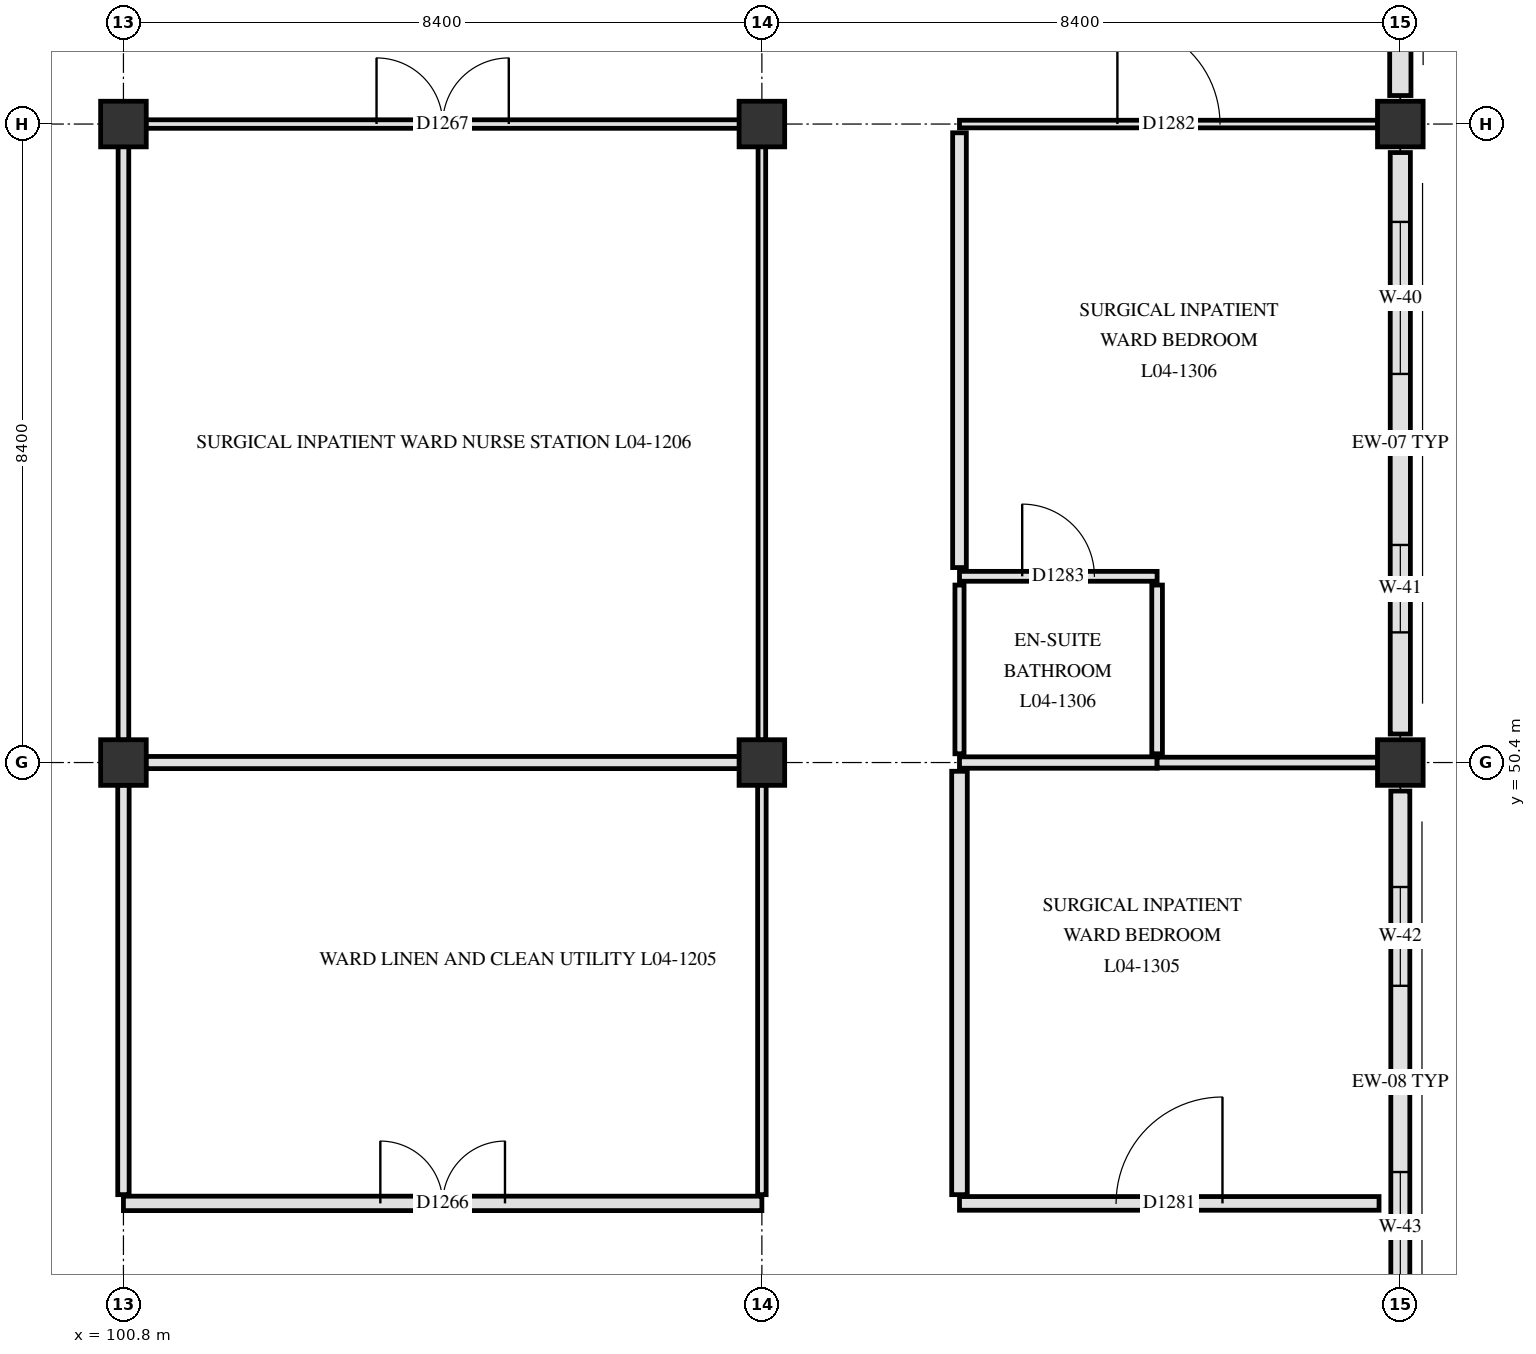
"""IFC4 building model, lengths in metres.
Left out: names, types, materials, properties, quantities, classifications, styles, units other than length and angle.
Written with IfcOpenShell. Run it as: python <this file> out.ifc"""

import sys

from ifc_helpers import new_model, si_unit, direction, frame, frame_2d, origin, origin_2d, place, context, subcontext, project, spatial, rectangle, extrude, element, fill, save


model = new_model("IFC4")
c1 = context("Model", 3, precision=1e-05, world=origin(), true_north=direction((0.0, 1.0)))
c2 = subcontext(c1, "Body", "Model", "MODEL_VIEW")
j1 = project(units=[si_unit("LENGTHUNIT", "METRE"), si_unit("PLANEANGLEUNIT", "RADIAN")], contexts=[c1])
p1 = place(None, origin())
s1 = spatial("IfcSite", under=j1, at=p1, CompositionType="ELEMENT")
p2 = place(p1, origin())
s2 = spatial("IfcBuilding", under=s1, at=p2, CompositionType="ELEMENT")
p3 = place(p2, frame((0.0, 0.0, 18.6)))
s3 = spatial("IfcBuildingStorey", under=s2, at=p3, CompositionType="ELEMENT", Elevation=18.6)
for number, where, z_axis, x_axis in (
    (1, (100.8, 50.4, 0.0), (0.0, 0.0, 1.0), (1.0, 0.0, 0.0)),
    (2, (100.8, 58.8, 0.0), (0.0, 0.0, 1.0), (1.0, 0.0, 0.0)),
    (3, (109.2, 50.4, 0.0), (0.0, 0.0, 1.0), (1.0, 0.0, 0.0)),
    (4, (109.2, 58.8, 0.0), (0.0, 0.0, 1.0), (1.0, 0.0, 0.0)),
    (5, (117.6, 50.4, 0.0), (0.0, 0.0, 1.0), (1.0, 0.0, 0.0)),
    (6, (117.6, 58.8, 0.0), (0.0, 0.0, 1.0), (1.0, 0.0, 0.0)),
):
    element("IfcColumn", number, at=place(p3, frame(where, z_axis=z_axis, x_axis=x_axis)), inside=s3, PredefinedType="COLUMN", context=c2, shape_type="SweptSolid", body=[
        extrude(rectangle(XDim=0.6, YDim=0.6, at=origin_2d()), origin(), (0.0, 0.0, 1.0), 3.9),
    ])
p4 = place(p3, frame((117.6, 67.2, 0.0), z_axis=(0.0, 0.0, 1.0), x_axis=(0.0, -1.0, 0.0)))
e7 = element("IfcWall", 7, at=p4, inside=s3, PredefinedType="SOLIDWALL", context=c2, shape_type="SweptSolid", body=[
    extrude(rectangle(XDim=8.025, YDim=0.28, at=frame_2d((4.012, 0.0))), origin(), (0.0, 0.0, 1.0), 3.11),
])
p5 = place(p4, frame((1.106, 0.0, 0.85)))
e8 = element("IfcOpeningElement", 8, at=p5, cuts=e7, PredefinedType="OPENING", context=c2, shape_type="SweptSolid", body=[
    extrude(rectangle(XDim=1.8, YDim=1.66, at=frame_2d((0.9, 0.83))), frame((0.0, 0.15, 0.0), z_axis=(0.0, -1.0, 0.0), x_axis=(1.0, 0.0, 0.0)), (0.0, 0.0, 1.0), 0.3),
])
p6 = place(p4, frame((5.069, 0.0, 0.85)))
e9 = element("IfcOpeningElement", 9, at=p6, cuts=e7, PredefinedType="OPENING", context=c2, shape_type="SweptSolid", body=[
    extrude(rectangle(XDim=1.9, YDim=1.66, at=frame_2d((0.95, 0.83))), frame((0.0, 0.15, 0.0), z_axis=(0.0, -1.0, 0.0), x_axis=(1.0, 0.0, 0.0)), (0.0, 0.0, 1.0), 0.3),
])
p7 = place(p3, frame((117.6, 58.425, 0.0), z_axis=(0.0, 0.0, 1.0), x_axis=(0.0, -1.0, 0.0)))
e10 = element("IfcWall", 10, at=p7, inside=s3, PredefinedType="SOLIDWALL", context=c2, shape_type="SweptSolid", body=[
    extrude(rectangle(XDim=7.65, YDim=0.265, at=frame_2d((3.825, 0.0))), origin(), (0.0, 0.0, 1.0), 3.38),
])
p8 = place(p7, frame((0.913, 0.0, 0.85)))
e11 = element("IfcOpeningElement", 11, at=p8, cuts=e10, PredefinedType="OPENING", context=c2, shape_type="SweptSolid", body=[
    extrude(rectangle(XDim=2.0, YDim=1.66, at=frame_2d((1.0, 0.83))), frame((0.0, 0.142, 0.0), z_axis=(0.0, -1.0, 0.0), x_axis=(1.0, 0.0, 0.0)), (0.0, 0.0, 1.0), 0.285),
])
p9 = place(p7, frame((5.163, 0.0, 0.85)))
e12 = element("IfcOpeningElement", 12, at=p9, cuts=e10, PredefinedType="OPENING", context=c2, shape_type="SweptSolid", body=[
    extrude(rectangle(XDim=1.15, YDim=1.78, at=frame_2d((0.575, 0.89))), frame((0.0, 0.142, 0.0), z_axis=(0.0, -1.0, 0.0), x_axis=(1.0, 0.0, 0.0)), (0.0, 0.0, 1.0), 0.285),
])
p10 = place(p3, frame((117.6, 50.025, 0.0), z_axis=(0.0, 0.0, 1.0), x_axis=(0.0, -1.0, 0.0)))
e13 = element("IfcWall", 13, at=p10, inside=s3, PredefinedType="SOLIDWALL", context=c2, shape_type="SweptSolid", body=[
    extrude(rectangle(XDim=7.65, YDim=0.25, at=frame_2d((3.825, 0.0))), origin(), (0.0, 0.0, 1.0), 3.38),
])
p11 = place(p10, frame((1.262, 0.0, 0.85)))
e14 = element("IfcOpeningElement", 14, at=p11, cuts=e13, PredefinedType="OPENING", context=c2, shape_type="SweptSolid", body=[
    extrude(rectangle(XDim=1.3, YDim=1.78, at=frame_2d((0.65, 0.89))), frame((0.0, 0.135, 0.0), z_axis=(0.0, -1.0, 0.0), x_axis=(1.0, 0.0, 0.0)), (0.0, 0.0, 1.0), 0.27),
])
p12 = place(p10, frame((5.012, 0.0, 0.85)))
e15 = element("IfcOpeningElement", 15, at=p12, cuts=e13, PredefinedType="OPENING", context=c2, shape_type="SweptSolid", body=[
    extrude(rectangle(XDim=1.45, YDim=1.78, at=frame_2d((0.725, 0.89))), frame((0.0, 0.135, 0.0), z_axis=(0.0, -1.0, 0.0), x_axis=(1.0, 0.0, 0.0)), (0.0, 0.0, 1.0), 0.27),
])
p13 = place(p3, frame((100.8, 44.6, 0.0), z_axis=(0.0, 0.0, 1.0), x_axis=(1.0, 0.0, 0.0)))
e16 = element("IfcWall", 16, at=p13, inside=s3, PredefinedType="PARTITIONING", context=c2, shape_type="SweptSolid", body=[
    extrude(rectangle(XDim=8.4, YDim=0.19, at=frame_2d((4.2, 0.0))), origin(), (0.0, 0.0, 1.0), 3.26),
])
p14 = place(p13, frame((3.38, 0.0, 0.0)))
e17 = element("IfcOpeningElement", 17, at=p14, cuts=e16, PredefinedType="OPENING", context=c2, shape_type="SweptSolid", body=[
    extrude(rectangle(XDim=1.64, YDim=2.28, at=frame_2d((0.82, 1.14))), frame((0.0, 0.105, 0.0), z_axis=(0.0, -1.0, 0.0), x_axis=(1.0, 0.0, 0.0)), (0.0, 0.0, 1.0), 0.21),
])
p15 = place(p3, frame((111.8, 44.6, 0.0), z_axis=(0.0, 0.0, 1.0), x_axis=(1.0, 0.0, 0.0)))
e18 = element("IfcWall", 18, at=p15, inside=s3, PredefinedType="PARTITIONING", context=c2, shape_type="SweptSolid", body=[
    extrude(rectangle(XDim=5.52, YDim=0.18, at=frame_2d((2.76, 0.0))), origin(), (0.0, 0.0, 1.0), 3.61),
])
p16 = place(p15, frame((2.06, 0.0, 0.0)))
e19 = element("IfcOpeningElement", 19, at=p16, cuts=e18, PredefinedType="OPENING", context=c2, shape_type="SweptSolid", body=[
    extrude(rectangle(XDim=1.4, YDim=2.2, at=frame_2d((0.7, 1.1))), frame((0.0, 0.1, 0.0), z_axis=(0.0, -1.0, 0.0), x_axis=(1.0, 0.0, 0.0)), (0.0, 0.0, 1.0), 0.2),
])
p17 = place(p3, frame((101.095, 50.4, 0.0), z_axis=(0.0, 0.0, 1.0), x_axis=(1.0, 0.0, 0.0)))
e20 = element("IfcWall", 20, at=p17, inside=s3, PredefinedType="PARTITIONING", context=c2, shape_type="SweptSolid", body=[
    extrude(rectangle(XDim=7.81, YDim=0.16, at=frame_2d((3.905, 0.0))), origin(), (0.0, 0.0, 1.0), 3.16),
])
p18 = place(p3, frame((111.8, 50.4, 0.0), z_axis=(0.0, 0.0, 1.0), x_axis=(1.0, 0.0, 0.0)))
e21 = element("IfcWall", 21, at=p18, inside=s3, PredefinedType="PARTITIONING", context=c2, shape_type="SweptSolid", body=[
    extrude(rectangle(XDim=2.6, YDim=0.15, at=frame_2d((1.3, 0.0))), origin(), (0.0, 0.0, 1.0), 3.16),
])
p19 = place(p3, frame((114.4, 50.4, 0.0), z_axis=(0.0, 0.0, 1.0), x_axis=(1.0, 0.0, 0.0)))
e22 = element("IfcWall", 22, at=p19, inside=s3, PredefinedType="PARTITIONING", context=c2, shape_type="SweptSolid", body=[
    extrude(rectangle(XDim=2.905, YDim=0.14, at=frame_2d((1.453, 0.0))), origin(), (0.0, 0.0, 1.0), 3.16),
])
p20 = place(p3, frame((111.8, 52.85, 0.0), z_axis=(0.0, 0.0, 1.0), x_axis=(1.0, 0.0, 0.0)))
e23 = element("IfcWall", 23, at=p20, inside=s3, PredefinedType="PARTITIONING", context=c2, shape_type="SweptSolid", body=[
    extrude(rectangle(XDim=2.6, YDim=0.13, at=frame_2d((1.3, 0.0))), origin(), (0.0, 0.0, 1.0), 3.61),
])
p21 = place(p20, frame((0.825, 0.0, 0.0)))
e24 = element("IfcOpeningElement", 24, at=p21, cuts=e23, PredefinedType="OPENING", context=c2, shape_type="SweptSolid", body=[
    extrude(rectangle(XDim=0.95, YDim=2.1, at=frame_2d((0.475, 1.05))), frame((0.0, 0.075, 0.0), z_axis=(0.0, -1.0, 0.0), x_axis=(1.0, 0.0, 0.0)), (0.0, 0.0, 1.0), 0.15),
])
p22 = place(p3, frame((101.095, 58.8, 0.0), z_axis=(0.0, 0.0, 1.0), x_axis=(1.0, 0.0, 0.0)))
e25 = element("IfcWall", 25, at=p22, inside=s3, PredefinedType="PARTITIONING", context=c2, shape_type="SweptSolid", body=[
    extrude(rectangle(XDim=7.81, YDim=0.112, at=frame_2d((3.905, 0.0))), origin(), (0.0, 0.0, 1.0), 3.16),
])
p23 = place(p22, frame((3.035, 0.0, 0.0)))
e26 = element("IfcOpeningElement", 26, at=p23, cuts=e25, PredefinedType="OPENING", context=c2, shape_type="SweptSolid", body=[
    extrude(rectangle(XDim=1.74, YDim=2.24, at=frame_2d((0.87, 1.12))), frame((0.0, 0.066, 0.0), z_axis=(0.0, -1.0, 0.0), x_axis=(1.0, 0.0, 0.0)), (0.0, 0.0, 1.0), 0.132),
])
p24 = place(p3, frame((111.8, 58.8, 0.0), z_axis=(0.0, 0.0, 1.0), x_axis=(1.0, 0.0, 0.0)))
e27 = element("IfcWall", 27, at=p24, inside=s3, PredefinedType="PARTITIONING", context=c2, shape_type="SweptSolid", body=[
    extrude(rectangle(XDim=5.505, YDim=0.1, at=frame_2d((2.752, 0.0))), origin(), (0.0, 0.0, 1.0), 3.16),
])
p25 = place(p24, frame((2.077, 0.0, 0.0)))
e28 = element("IfcOpeningElement", 28, at=p25, cuts=e27, PredefinedType="OPENING", context=c2, shape_type="SweptSolid", body=[
    extrude(rectangle(XDim=1.35, YDim=2.2, at=frame_2d((0.675, 1.1))), frame((0.0, 0.06, 0.0), z_axis=(0.0, -1.0, 0.0), x_axis=(1.0, 0.0, 0.0)), (0.0, 0.0, 1.0), 0.12),
])
p26 = place(p3, frame((100.8, 44.715, 0.0), z_axis=(0.0, 0.0, 1.0), x_axis=(0.0, 1.0, 0.0)))
e29 = element("IfcWall", 29, at=p26, inside=s3, PredefinedType="PARTITIONING", context=c2, shape_type="SweptSolid", body=[
    extrude(rectangle(XDim=5.39, YDim=0.15, at=frame_2d((2.695, 0.0))), origin(), (0.0, 0.0, 1.0), 3.26),
])
p27 = place(p3, frame((100.8, 50.695, 0.0), z_axis=(0.0, 0.0, 1.0), x_axis=(0.0, 1.0, 0.0)))
e30 = element("IfcWall", 30, at=p27, inside=s3, PredefinedType="PARTITIONING", context=c2, shape_type="SweptSolid", body=[
    extrude(rectangle(XDim=7.81, YDim=0.14, at=frame_2d((3.905, 0.0))), origin(), (0.0, 0.0, 1.0), 3.26),
])
p28 = place(p3, frame((109.2, 44.715, 0.0), z_axis=(0.0, 0.0, 1.0), x_axis=(0.0, 1.0, 0.0)))
e31 = element("IfcWall", 31, at=p28, inside=s3, PredefinedType="PARTITIONING", context=c2, shape_type="SweptSolid", body=[
    extrude(rectangle(XDim=5.39, YDim=0.112, at=frame_2d((2.695, 0.0))), origin(), (0.0, 0.0, 1.0), 3.26),
])
p29 = place(p3, frame((109.2, 50.695, 0.0), z_axis=(0.0, 0.0, 1.0), x_axis=(0.0, 1.0, 0.0)))
e32 = element("IfcWall", 32, at=p29, inside=s3, PredefinedType="PARTITIONING", context=c2, shape_type="SweptSolid", body=[
    extrude(rectangle(XDim=7.81, YDim=0.1, at=frame_2d((3.905, 0.0))), origin(), (0.0, 0.0, 1.0), 3.26),
])
p30 = place(p3, frame((111.8, 44.715, 0.0), z_axis=(0.0, 0.0, 1.0), x_axis=(0.0, 1.0, 0.0)))
e33 = element("IfcWall", 33, at=p30, inside=s3, PredefinedType="PARTITIONING", context=c2, shape_type="SweptSolid", body=[
    extrude(rectangle(XDim=5.57, YDim=0.205, at=frame_2d((2.785, 0.0))), origin(), (0.0, 0.0, 1.0), 3.31),
])
p31 = place(p3, frame((111.8, 50.515, 0.0), z_axis=(0.0, 0.0, 1.0), x_axis=(0.0, 1.0, 0.0)))
e34 = element("IfcWall", 34, at=p31, inside=s3, PredefinedType="PARTITIONING", context=c2, shape_type="SweptSolid", body=[
    extrude(rectangle(XDim=2.22, YDim=0.12, at=frame_2d((1.11, 0.0))), origin(), (0.0, 0.0, 1.0), 3.61),
])
p32 = place(p3, frame((111.8, 52.965, 0.0), z_axis=(0.0, 0.0, 1.0), x_axis=(0.0, 1.0, 0.0)))
e35 = element("IfcWall", 35, at=p32, inside=s3, PredefinedType="PARTITIONING", context=c2, shape_type="SweptSolid", body=[
    extrude(rectangle(XDim=5.72, YDim=0.18, at=frame_2d((2.86, 0.0))), origin(), (0.0, 0.0, 1.0), 3.31),
])
p33 = place(p3, frame((114.4, 50.515, 0.0), z_axis=(0.0, 0.0, 1.0), x_axis=(0.0, 1.0, 0.0)))
e36 = element("IfcWall", 36, at=p33, inside=s3, PredefinedType="PARTITIONING", context=c2, shape_type="SweptSolid", body=[
    extrude(rectangle(XDim=2.22, YDim=0.14, at=frame_2d((1.11, 0.0))), origin(), (0.0, 0.0, 1.0), 3.61),
])
p34 = place(p8, origin())
e37 = element("IfcWindow", 37, at=p34, inside=s3, PartitioningType="SINGLE_PANEL", PredefinedType="WINDOW", context=c2, shape_type="SweptSolid", body=[
    extrude(rectangle(XDim=2.0, YDim=1.66, at=frame_2d((1.0, 0.83))), frame((0.0, 0.03, 0.0), z_axis=(0.0, -1.0, 0.0), x_axis=(1.0, 0.0, 0.0)), (0.0, 0.0, 1.0), 0.06),
])
fill(e11, e37)
p35 = place(p9, origin())
e38 = element("IfcWindow", 38, at=p35, inside=s3, PartitioningType="SINGLE_PANEL", PredefinedType="WINDOW", context=c2, shape_type="SweptSolid", body=[
    extrude(rectangle(XDim=1.15, YDim=1.78, at=frame_2d((0.575, 0.89))), frame((0.0, 0.03, 0.0), z_axis=(0.0, -1.0, 0.0), x_axis=(1.0, 0.0, 0.0)), (0.0, 0.0, 1.0), 0.06),
])
fill(e12, e38)
p36 = place(p11, origin())
e39 = element("IfcWindow", 39, at=p36, inside=s3, PartitioningType="SINGLE_PANEL", PredefinedType="WINDOW", context=c2, shape_type="SweptSolid", body=[
    extrude(rectangle(XDim=1.3, YDim=1.78, at=frame_2d((0.65, 0.89))), frame((0.0, 0.03, 0.0), z_axis=(0.0, -1.0, 0.0), x_axis=(1.0, 0.0, 0.0)), (0.0, 0.0, 1.0), 0.06),
])
fill(e14, e39)
p37 = place(p12, origin())
e40 = element("IfcWindow", 40, at=p37, inside=s3, PartitioningType="SINGLE_PANEL", PredefinedType="WINDOW", context=c2, shape_type="SweptSolid", body=[
    extrude(rectangle(XDim=1.45, YDim=1.78, at=frame_2d((0.725, 0.89))), frame((0.0, 0.03, 0.0), z_axis=(0.0, -1.0, 0.0), x_axis=(1.0, 0.0, 0.0)), (0.0, 0.0, 1.0), 0.06),
])
fill(e15, e40)
p38 = place(p14, origin())
e41 = element("IfcDoor", 41, at=p38, inside=s3, OperationType="DOUBLE_SWING_LEFT", PredefinedType="DOOR", context=c2, shape_type="SweptSolid", body=[
    extrude(rectangle(XDim=1.64, YDim=2.28, at=frame_2d((0.82, 1.14))), frame((0.0, 0.025, 0.0), z_axis=(0.0, -1.0, 0.0), x_axis=(1.0, 0.0, 0.0)), (0.0, 0.0, 1.0), 0.05),
])
fill(e17, e41)
p39 = place(p23, origin())
e42 = element("IfcDoor", 42, at=p39, inside=s3, OperationType="DOUBLE_SWING_RIGHT", PredefinedType="DOOR", context=c2, shape_type="SweptSolid", body=[
    extrude(rectangle(XDim=1.74, YDim=2.24, at=frame_2d((0.87, 1.12))), frame((0.0, 0.025, 0.0), z_axis=(0.0, -1.0, 0.0), x_axis=(1.0, 0.0, 0.0)), (0.0, 0.0, 1.0), 0.05),
])
fill(e26, e42)
p40 = place(p16, origin())
e43 = element("IfcDoor", 43, at=p40, inside=s3, OperationType="SINGLE_SWING_RIGHT", PredefinedType="DOOR", context=c2, shape_type="SweptSolid", body=[
    extrude(rectangle(XDim=1.4, YDim=2.2, at=frame_2d((0.7, 1.1))), frame((0.0, 0.025, 0.0), z_axis=(0.0, -1.0, 0.0), x_axis=(1.0, 0.0, 0.0)), (0.0, 0.0, 1.0), 0.05),
])
fill(e19, e43)
p41 = place(p25, origin())
e44 = element("IfcDoor", 44, at=p41, inside=s3, OperationType="SINGLE_SWING_LEFT", PredefinedType="DOOR", context=c2, shape_type="SweptSolid", body=[
    extrude(rectangle(XDim=1.35, YDim=2.2, at=frame_2d((0.675, 1.1))), frame((0.0, 0.025, 0.0), z_axis=(0.0, -1.0, 0.0), x_axis=(1.0, 0.0, 0.0)), (0.0, 0.0, 1.0), 0.05),
])
fill(e28, e44)
p42 = place(p21, origin())
e45 = element("IfcDoor", 45, at=p42, inside=s3, OperationType="SINGLE_SWING_LEFT", PredefinedType="DOOR", context=c2, shape_type="SweptSolid", body=[
    extrude(rectangle(XDim=0.95, YDim=2.1, at=frame_2d((0.475, 1.05))), frame((0.0, 0.025, 0.0), z_axis=(0.0, -1.0, 0.0), x_axis=(1.0, 0.0, 0.0)), (0.0, 0.0, 1.0), 0.05),
])
fill(e24, e45)
save(model, sys.argv[1])
